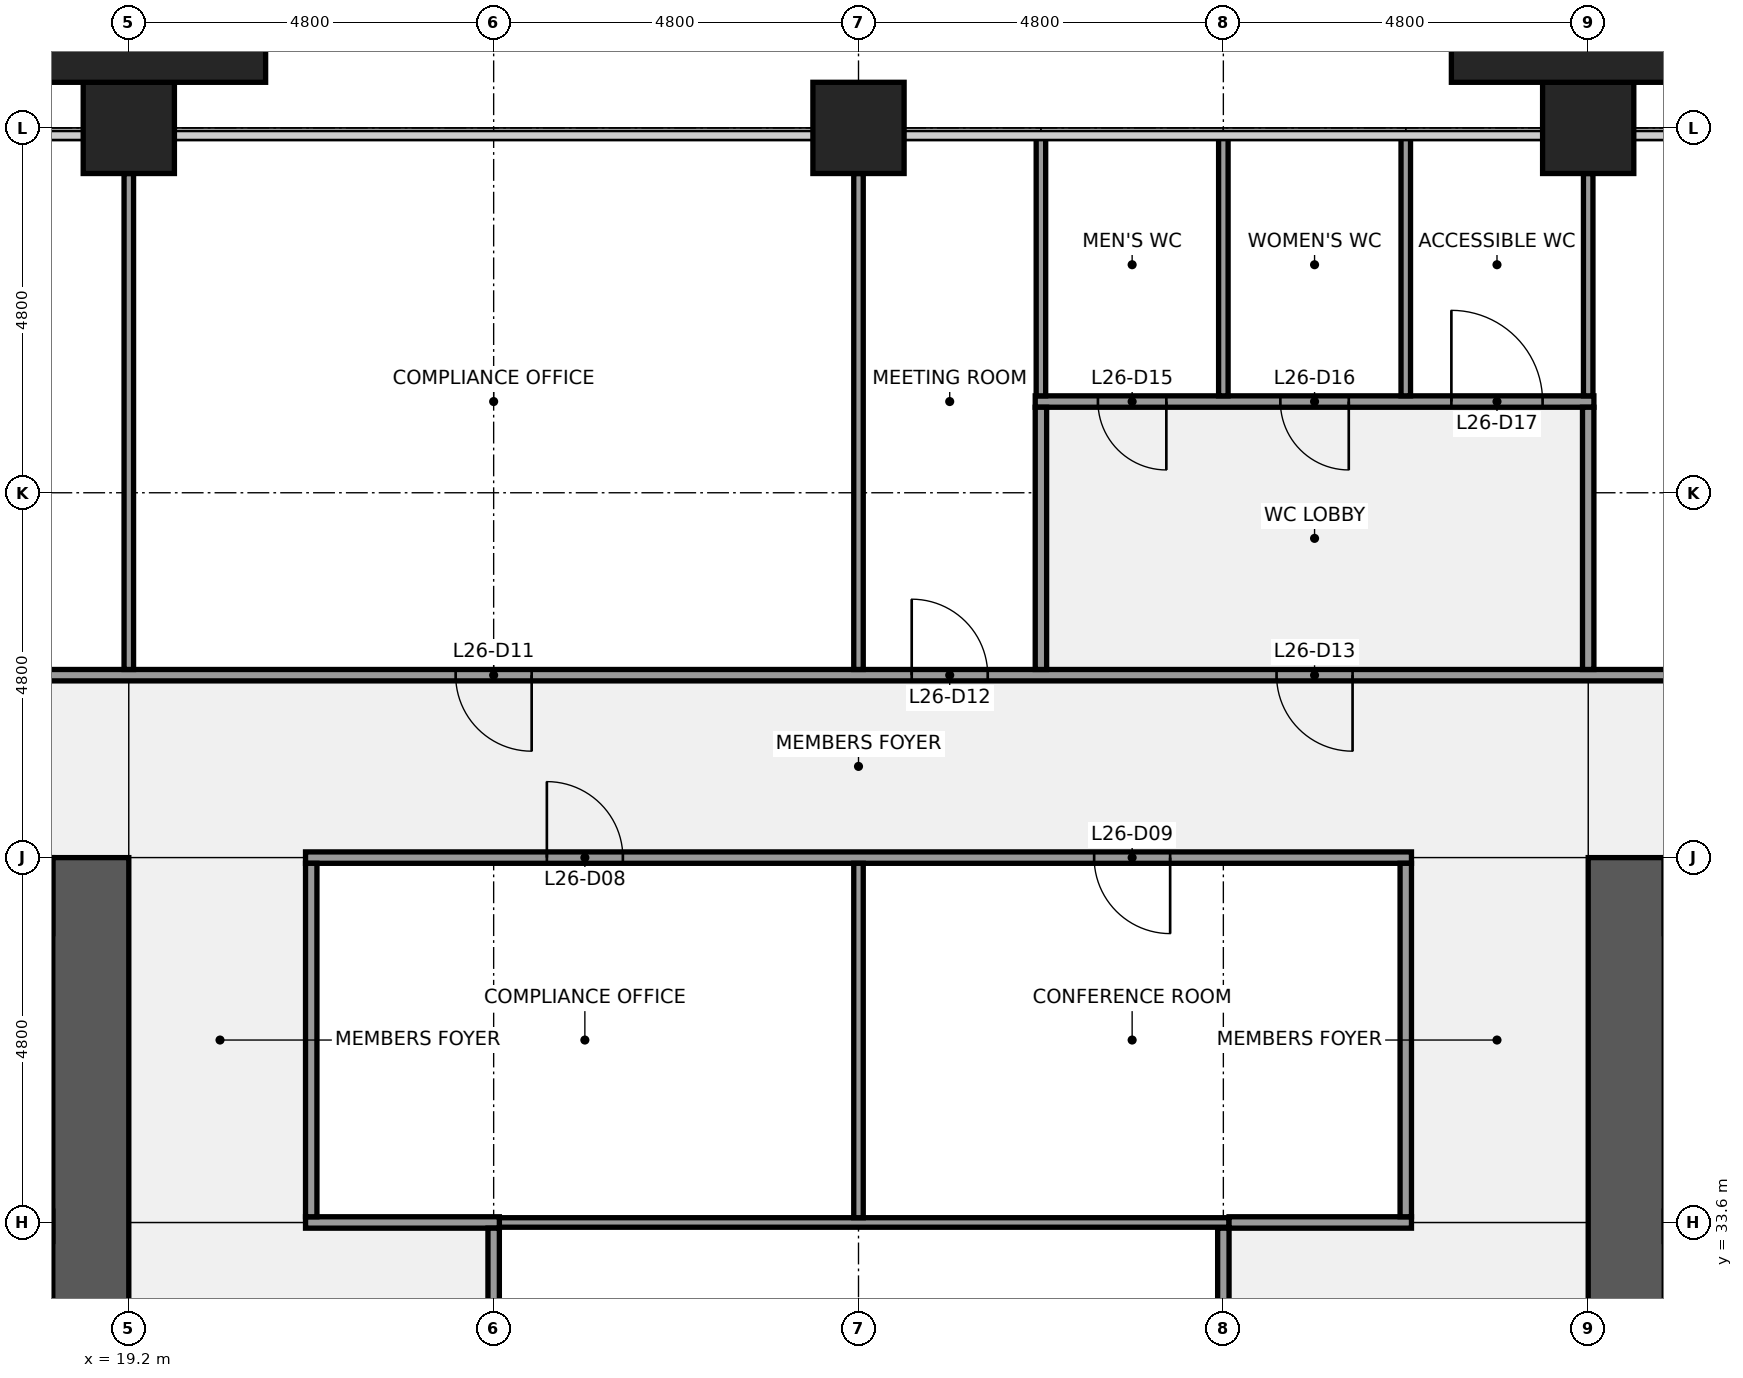
"""IFC4 building model, lengths in metres.
Left out: names, types, materials, properties, quantities, classifications, styles, units other than length and angle.
Written with IfcOpenShell. Run it as: python <this file> out.ifc"""

import sys

from ifc_helpers import new_model, si_unit, direction, frame, frame_2d, origin, origin_2d, place, context, subcontext, project, spatial, rectangle, extrude, element, fill, save


model = new_model("IFC4")
c1 = context("Model", 3, precision=1e-05, world=origin(), true_north=direction((0.0, 1.0)))
c2 = subcontext(c1, "Body", "Model", "MODEL_VIEW")
j1 = project(units=[si_unit("LENGTHUNIT", "METRE"), si_unit("PLANEANGLEUNIT", "RADIAN")], contexts=[c1])
p1 = place(None, origin())
s1 = spatial("IfcSite", under=j1, at=p1, CompositionType="ELEMENT")
p2 = place(p1, origin())
s2 = spatial("IfcBuilding", under=s1, at=p2, CompositionType="ELEMENT")
p3 = place(p2, frame((0.0, 0.0, 124.1)))
s3 = spatial("IfcBuildingStorey", under=s2, at=p3, CompositionType="ELEMENT", Elevation=124.1)
for number, where, z_axis, x_axis in (
    (1, (19.2, 48.0, 0.0), (0.0, 0.0, 1.0), (1.0, 0.0, 0.0)),
    (2, (28.8, 48.0, 0.0), (0.0, 0.0, 1.0), (1.0, 0.0, 0.0)),
    (3, (38.4, 48.0, 0.0), (0.0, 0.0, 1.0), (1.0, 0.0, 0.0)),
):
    element("IfcColumn", number, at=place(p3, frame(where, z_axis=z_axis, x_axis=x_axis)), inside=s3, PredefinedType="COLUMN", context=c2, shape_type="SweptSolid", body=[
        extrude(rectangle(XDim=1.2, YDim=1.2, at=origin_2d()), origin(), (0.0, 0.0, 1.0), 4.0),
    ])
p4 = place(p3, frame((18.7, 38.4, 0.0), z_axis=(0.0, 0.0, 1.0), x_axis=(0.0, -1.0, 0.0)))
e4 = element("IfcWall", 4, at=p4, inside=s3, PredefinedType="SHEAR", context=c2, shape_type="SweptSolid", body=[
    extrude(rectangle(XDim=28.8, YDim=1.0, at=frame_2d((14.4, 0.0))), origin(), (0.0, 0.0, 1.0), 3.84),
])
p5 = place(p4, frame((18.3, 0.0, 0.0)))
e5 = element("IfcOpeningElement", 5, at=p5, cuts=e4, PredefinedType="OPENING", context=c2, shape_type="SweptSolid", body=[
    extrude(rectangle(XDim=1.8, YDim=2.1, at=frame_2d((0.9, 1.05))), frame((0.0, 0.51, 0.0), z_axis=(0.0, -1.0, 0.0), x_axis=(1.0, 0.0, 0.0)), (0.0, 0.0, 1.0), 1.02),
])
p6 = place(p4, frame((8.7, 0.0, 0.0)))
e6 = element("IfcOpeningElement", 6, at=p6, cuts=e4, PredefinedType="OPENING", context=c2, shape_type="SweptSolid", body=[
    extrude(rectangle(XDim=1.8, YDim=2.1, at=frame_2d((0.9, 1.05))), frame((0.0, 0.51, 0.0), z_axis=(0.0, -1.0, 0.0), x_axis=(1.0, 0.0, 0.0)), (0.0, 0.0, 1.0), 1.02),
])
p7 = place(p3, frame((1.0, 33.55, 0.0), z_axis=(0.0, 0.0, 1.0), x_axis=(1.0, 0.0, 0.0)))
e7 = element("IfcWall", 7, at=p7, inside=s3, PredefinedType="SHEAR", context=c2, shape_type="SweptSolid", body=[
    extrude(rectangle(XDim=17.2, YDim=0.4, at=frame_2d((8.6, 0.0))), origin(), (0.0, 0.0, 1.0), 3.84),
])
p8 = place(p3, frame((38.9, 9.6, 0.0), z_axis=(0.0, 0.0, 1.0), x_axis=(0.0, 1.0, 0.0)))
e8 = element("IfcWall", 8, at=p8, inside=s3, PredefinedType="SHEAR", context=c2, shape_type="SweptSolid", body=[
    extrude(rectangle(XDim=28.8, YDim=1.0, at=frame_2d((14.4, 0.0))), origin(), (0.0, 0.0, 1.0), 3.84),
])
p9 = place(p8, frame((8.7, 0.0, 0.0)))
e9 = element("IfcOpeningElement", 9, at=p9, cuts=e8, PredefinedType="OPENING", context=c2, shape_type="SweptSolid", body=[
    extrude(rectangle(XDim=1.8, YDim=2.1, at=frame_2d((0.9, 1.05))), frame((0.0, 0.51, 0.0), z_axis=(0.0, -1.0, 0.0), x_axis=(1.0, 0.0, 0.0)), (0.0, 0.0, 1.0), 1.02),
])
p10 = place(p8, frame((18.3, 0.0, 0.0)))
e10 = element("IfcOpeningElement", 10, at=p10, cuts=e8, PredefinedType="OPENING", context=c2, shape_type="SweptSolid", body=[
    extrude(rectangle(XDim=1.8, YDim=2.1, at=frame_2d((0.9, 1.05))), frame((0.0, 0.51, 0.0), z_axis=(0.0, -1.0, 0.0), x_axis=(1.0, 0.0, 0.0)), (0.0, 0.0, 1.0), 1.02),
])
p11 = place(p3, frame((24.075, 33.6, 0.0), z_axis=(0.0, 0.0, 1.0), x_axis=(1.0, 0.0, 0.0)))
e11 = element("IfcWall", 11, at=p11, inside=s3, PredefinedType="PARTITIONING", context=c2, shape_type="SweptSolid", body=[
    extrude(rectangle(XDim=9.6, YDim=0.125, at=frame_2d((4.8, 0.0))), origin(), (0.0, 0.0, 1.0), 2.849),
])
p12 = place(p3, frame((21.525, 33.6, 0.0), z_axis=(0.0, 0.0, 1.0), x_axis=(1.0, 0.0, 0.0)))
e12 = element("IfcWall", 12, at=p12, inside=s3, PredefinedType="PARTITIONING", context=c2, shape_type="SweptSolid", body=[
    extrude(rectangle(XDim=2.55, YDim=0.15, at=frame_2d((1.275, 0.0))), origin(), (0.0, 0.0, 1.0), 2.849),
])
p13 = place(p3, frame((33.675, 33.6, 0.0), z_axis=(0.0, 0.0, 1.0), x_axis=(1.0, 0.0, 0.0)))
e13 = element("IfcWall", 13, at=p13, inside=s3, PredefinedType="PARTITIONING", context=c2, shape_type="SweptSolid", body=[
    extrude(rectangle(XDim=2.4, YDim=0.15, at=frame_2d((1.2, 0.0))), origin(), (0.0, 0.0, 1.0), 2.849),
])
p14 = place(p3, frame((21.525, 38.4, 0.0), z_axis=(0.0, 0.0, 1.0), x_axis=(1.0, 0.0, 0.0)))
e14 = element("IfcWall", 14, at=p14, inside=s3, PredefinedType="PARTITIONING", context=c2, shape_type="SweptSolid", body=[
    extrude(rectangle(XDim=14.55, YDim=0.15, at=frame_2d((7.275, 0.0))), origin(), (0.0, 0.0, 1.0), 2.849),
])
p15 = place(p14, frame((3.175, 0.0, 0.0)))
e15 = element("IfcOpeningElement", 15, at=p15, cuts=e14, PredefinedType="OPENING", context=c2, shape_type="SweptSolid", body=[
    extrude(rectangle(XDim=1.0, YDim=2.1, at=frame_2d((0.5, 1.05))), frame((0.0, 0.085, 0.0), z_axis=(0.0, -1.0, 0.0), x_axis=(1.0, 0.0, 0.0)), (0.0, 0.0, 1.0), 0.17),
])
p16 = place(p14, frame((10.375, 0.0, 0.0)))
e16 = element("IfcOpeningElement", 16, at=p16, cuts=e14, PredefinedType="OPENING", context=c2, shape_type="SweptSolid", body=[
    extrude(rectangle(XDim=1.0, YDim=2.1, at=frame_2d((0.5, 1.05))), frame((0.0, 0.085, 0.0), z_axis=(0.0, -1.0, 0.0), x_axis=(1.0, 0.0, 0.0)), (0.0, 0.0, 1.0), 0.17),
])
p17 = place(p3, frame((14.325, 40.8, 0.0), z_axis=(0.0, 0.0, 1.0), x_axis=(1.0, 0.0, 0.0)))
e17 = element("IfcWall", 17, at=p17, inside=s3, PredefinedType="PARTITIONING", context=c2, shape_type="SweptSolid", body=[
    extrude(rectangle(XDim=28.95, YDim=0.15, at=frame_2d((14.475, 0.0))), origin(), (0.0, 0.0, 1.0), 2.849),
])
p18 = place(p17, frame((1.975, 0.0, 0.0)))
e18 = element("IfcOpeningElement", 18, at=p18, cuts=e17, PredefinedType="OPENING", context=c2, shape_type="SweptSolid", body=[
    extrude(rectangle(XDim=1.0, YDim=2.1, at=frame_2d((0.5, 1.05))), frame((0.0, 0.085, 0.0), z_axis=(0.0, -1.0, 0.0), x_axis=(1.0, 0.0, 0.0)), (0.0, 0.0, 1.0), 0.17),
])
p19 = place(p17, frame((9.175, 0.0, 0.0)))
e19 = element("IfcOpeningElement", 19, at=p19, cuts=e17, PredefinedType="OPENING", context=c2, shape_type="SweptSolid", body=[
    extrude(rectangle(XDim=1.0, YDim=2.1, at=frame_2d((0.5, 1.05))), frame((0.0, 0.085, 0.0), z_axis=(0.0, -1.0, 0.0), x_axis=(1.0, 0.0, 0.0)), (0.0, 0.0, 1.0), 0.17),
])
p20 = place(p17, frame((15.175, 0.0, 0.0)))
e20 = element("IfcOpeningElement", 20, at=p20, cuts=e17, PredefinedType="OPENING", context=c2, shape_type="SweptSolid", body=[
    extrude(rectangle(XDim=1.0, YDim=2.1, at=frame_2d((0.5, 1.05))), frame((0.0, 0.085, 0.0), z_axis=(0.0, -1.0, 0.0), x_axis=(1.0, 0.0, 0.0)), (0.0, 0.0, 1.0), 0.17),
])
p21 = place(p17, frame((19.975, 0.0, 0.0)))
e21 = element("IfcOpeningElement", 21, at=p21, cuts=e17, PredefinedType="OPENING", context=c2, shape_type="SweptSolid", body=[
    extrude(rectangle(XDim=1.0, YDim=2.1, at=frame_2d((0.5, 1.05))), frame((0.0, 0.085, 0.0), z_axis=(0.0, -1.0, 0.0), x_axis=(1.0, 0.0, 0.0)), (0.0, 0.0, 1.0), 0.17),
])
p22 = place(p17, frame((25.975, 0.0, 0.0)))
e22 = element("IfcOpeningElement", 22, at=p22, cuts=e17, PredefinedType="OPENING", context=c2, shape_type="SweptSolid", body=[
    extrude(rectangle(XDim=1.0, YDim=2.1, at=frame_2d((0.5, 1.05))), frame((0.0, 0.085, 0.0), z_axis=(0.0, -1.0, 0.0), x_axis=(1.0, 0.0, 0.0)), (0.0, 0.0, 1.0), 0.17),
])
p23 = place(p3, frame((31.125, 44.4, 0.0), z_axis=(0.0, 0.0, 1.0), x_axis=(1.0, 0.0, 0.0)))
e23 = element("IfcWall", 23, at=p23, inside=s3, PredefinedType="PARTITIONING", context=c2, shape_type="SweptSolid", body=[
    extrude(rectangle(XDim=7.35, YDim=0.15, at=frame_2d((3.675, 0.0))), origin(), (0.0, 0.0, 1.0), 2.849),
])
p24 = place(p23, frame((0.825, 0.0, 0.0)))
e24 = element("IfcOpeningElement", 24, at=p24, cuts=e23, PredefinedType="OPENING", context=c2, shape_type="SweptSolid", body=[
    extrude(rectangle(XDim=0.9, YDim=2.1, at=frame_2d((0.45, 1.05))), frame((0.0, 0.085, 0.0), z_axis=(0.0, -1.0, 0.0), x_axis=(1.0, 0.0, 0.0)), (0.0, 0.0, 1.0), 0.17),
])
p25 = place(p23, frame((3.225, 0.0, 0.0)))
e25 = element("IfcOpeningElement", 25, at=p25, cuts=e23, PredefinedType="OPENING", context=c2, shape_type="SweptSolid", body=[
    extrude(rectangle(XDim=0.9, YDim=2.1, at=frame_2d((0.45, 1.05))), frame((0.0, 0.085, 0.0), z_axis=(0.0, -1.0, 0.0), x_axis=(1.0, 0.0, 0.0)), (0.0, 0.0, 1.0), 0.17),
])
p26 = place(p23, frame((5.475, 0.0, 0.0)))
e26 = element("IfcOpeningElement", 26, at=p26, cuts=e23, PredefinedType="OPENING", context=c2, shape_type="SweptSolid", body=[
    extrude(rectangle(XDim=1.2, YDim=2.1, at=frame_2d((0.6, 1.05))), frame((0.0, 0.085, 0.0), z_axis=(0.0, -1.0, 0.0), x_axis=(1.0, 0.0, 0.0)), (0.0, 0.0, 1.0), 0.17),
])
p27 = place(p3, frame((19.2, 40.875, 0.0), z_axis=(0.0, 0.0, 1.0), x_axis=(0.0, 1.0, 0.0)))
e27 = element("IfcWall", 27, at=p27, inside=s3, PredefinedType="PARTITIONING", context=c2, shape_type="SweptSolid", body=[
    extrude(rectangle(XDim=6.525, YDim=0.125, at=frame_2d((3.262, 0.0))), origin(), (0.0, 0.0, 1.0), 2.849),
])
p28 = place(p3, frame((21.6, 33.675, 0.0), z_axis=(0.0, 0.0, 1.0), x_axis=(0.0, 1.0, 0.0)))
e28 = element("IfcWall", 28, at=p28, inside=s3, PredefinedType="PARTITIONING", context=c2, shape_type="SweptSolid", body=[
    extrude(rectangle(XDim=4.65, YDim=0.15, at=frame_2d((2.325, 0.0))), origin(), (0.0, 0.0, 1.0), 2.849),
])
p29 = place(p3, frame((24.0, 26.475, 0.0), z_axis=(0.0, 0.0, 1.0), x_axis=(0.0, 1.0, 0.0)))
e29 = element("IfcWall", 29, at=p29, inside=s3, PredefinedType="PARTITIONING", context=c2, shape_type="SweptSolid", body=[
    extrude(rectangle(XDim=7.05, YDim=0.15, at=frame_2d((3.525, 0.0))), origin(), (0.0, 0.0, 1.0), 2.849),
])
p30 = place(p3, frame((28.8, 33.663, 0.0), z_axis=(0.0, 0.0, 1.0), x_axis=(0.0, 1.0, 0.0)))
e30 = element("IfcWall", 30, at=p30, inside=s3, PredefinedType="PARTITIONING", context=c2, shape_type="SweptSolid", body=[
    extrude(rectangle(XDim=4.662, YDim=0.125, at=frame_2d((2.331, 0.0))), origin(), (0.0, 0.0, 1.0), 2.849),
])
p31 = place(p3, frame((28.8, 40.875, 0.0), z_axis=(0.0, 0.0, 1.0), x_axis=(0.0, 1.0, 0.0)))
e31 = element("IfcWall", 31, at=p31, inside=s3, PredefinedType="PARTITIONING", context=c2, shape_type="SweptSolid", body=[
    extrude(rectangle(XDim=6.525, YDim=0.125, at=frame_2d((3.262, 0.0))), origin(), (0.0, 0.0, 1.0), 2.849),
])
p32 = place(p3, frame((31.2, 44.475, 0.0), z_axis=(0.0, 0.0, 1.0), x_axis=(0.0, 1.0, 0.0)))
e32 = element("IfcWall", 32, at=p32, inside=s3, PredefinedType="PARTITIONING", context=c2, shape_type="SweptSolid", body=[
    extrude(rectangle(XDim=3.425, YDim=0.125, at=frame_2d((1.712, 0.0))), origin(), (0.0, 0.0, 1.0), 2.849),
])
p33 = place(p3, frame((31.2, 40.875, 0.0), z_axis=(0.0, 0.0, 1.0), x_axis=(0.0, 1.0, 0.0)))
e33 = element("IfcWall", 33, at=p33, inside=s3, PredefinedType="PARTITIONING", context=c2, shape_type="SweptSolid", body=[
    extrude(rectangle(XDim=3.45, YDim=0.15, at=frame_2d((1.725, 0.0))), origin(), (0.0, 0.0, 1.0), 2.849),
])
p34 = place(p3, frame((33.6, 44.475, 0.0), z_axis=(0.0, 0.0, 1.0), x_axis=(0.0, 1.0, 0.0)))
e34 = element("IfcWall", 34, at=p34, inside=s3, PredefinedType="PARTITIONING", context=c2, shape_type="SweptSolid", body=[
    extrude(rectangle(XDim=3.425, YDim=0.125, at=frame_2d((1.712, 0.0))), origin(), (0.0, 0.0, 1.0), 2.849),
])
p35 = place(p3, frame((33.6, 26.475, 0.0), z_axis=(0.0, 0.0, 1.0), x_axis=(0.0, 1.0, 0.0)))
e35 = element("IfcWall", 35, at=p35, inside=s3, PredefinedType="PARTITIONING", context=c2, shape_type="SweptSolid", body=[
    extrude(rectangle(XDim=7.05, YDim=0.15, at=frame_2d((3.525, 0.0))), origin(), (0.0, 0.0, 1.0), 2.849),
])
p36 = place(p3, frame((36.0, 44.475, 0.0), z_axis=(0.0, 0.0, 1.0), x_axis=(0.0, 1.0, 0.0)))
e36 = element("IfcWall", 36, at=p36, inside=s3, PredefinedType="PARTITIONING", context=c2, shape_type="SweptSolid", body=[
    extrude(rectangle(XDim=3.425, YDim=0.125, at=frame_2d((1.712, 0.0))), origin(), (0.0, 0.0, 1.0), 2.849),
])
p37 = place(p3, frame((36.0, 33.675, 0.0), z_axis=(0.0, 0.0, 1.0), x_axis=(0.0, 1.0, 0.0)))
e37 = element("IfcWall", 37, at=p37, inside=s3, PredefinedType="PARTITIONING", context=c2, shape_type="SweptSolid", body=[
    extrude(rectangle(XDim=4.65, YDim=0.15, at=frame_2d((2.325, 0.0))), origin(), (0.0, 0.0, 1.0), 2.849),
])
p38 = place(p3, frame((38.4, 44.475, 0.0), z_axis=(0.0, 0.0, 1.0), x_axis=(0.0, 1.0, 0.0)))
e38 = element("IfcWall", 38, at=p38, inside=s3, PredefinedType="PARTITIONING", context=c2, shape_type="SweptSolid", body=[
    extrude(rectangle(XDim=2.925, YDim=0.125, at=frame_2d((1.462, 0.0))), origin(), (0.0, 0.0, 1.0), 2.849),
])
p39 = place(p3, frame((38.4, 40.875, 0.0), z_axis=(0.0, 0.0, 1.0), x_axis=(0.0, 1.0, 0.0)))
e39 = element("IfcWall", 39, at=p39, inside=s3, PredefinedType="PARTITIONING", context=c2, shape_type="SweptSolid", body=[
    extrude(rectangle(XDim=3.45, YDim=0.15, at=frame_2d((1.725, 0.0))), origin(), (0.0, 0.0, 1.0), 2.849),
])
for number, where, z_axis, x_axis in (
    (40, (19.2, 49.05, 0.0), (0.0, 0.0, 1.0), (1.0, 0.0, 0.0)),
    (41, (38.4, 49.05, 0.0), (0.0, 0.0, 1.0), (1.0, 0.0, 0.0)),
):
    element("IfcColumn", number, at=place(p3, frame(where, z_axis=z_axis, x_axis=x_axis)), inside=s3, PredefinedType="PILASTER", context=c2, shape_type="SweptSolid", body=[
        extrude(rectangle(XDim=3.6, YDim=0.9, at=origin_2d()), origin(), (0.0, 0.0, 1.0), 4.0),
    ])
p40 = place(p15, origin())
e42 = element("IfcDoor", 42, at=p40, inside=s3, OperationType="SINGLE_SWING_LEFT", PredefinedType="DOOR", context=c2, shape_type="SweptSolid", body=[
    extrude(rectangle(XDim=1.0, YDim=2.1, at=frame_2d((0.5, 1.05))), frame((0.0, 0.025, 0.0), z_axis=(0.0, -1.0, 0.0), x_axis=(1.0, 0.0, 0.0)), (0.0, 0.0, 1.0), 0.05),
])
fill(e15, e42)
p41 = place(p16, origin())
e43 = element("IfcDoor", 43, at=p41, inside=s3, OperationType="SINGLE_SWING_RIGHT", PredefinedType="DOOR", context=c2, shape_type="SweptSolid", body=[
    extrude(rectangle(XDim=1.0, YDim=2.1, at=frame_2d((0.5, 1.05))), frame((0.0, 0.025, 0.0), z_axis=(0.0, -1.0, 0.0), x_axis=(1.0, 0.0, 0.0)), (0.0, 0.0, 1.0), 0.05),
])
fill(e16, e43)
p42 = place(p19, origin())
e44 = element("IfcDoor", 44, at=p42, inside=s3, OperationType="SINGLE_SWING_RIGHT", PredefinedType="DOOR", context=c2, shape_type="SweptSolid", body=[
    extrude(rectangle(XDim=1.0, YDim=2.1, at=frame_2d((0.5, 1.05))), frame((0.0, 0.025, 0.0), z_axis=(0.0, -1.0, 0.0), x_axis=(1.0, 0.0, 0.0)), (0.0, 0.0, 1.0), 0.05),
])
fill(e19, e44)
p43 = place(p20, origin())
e45 = element("IfcDoor", 45, at=p43, inside=s3, OperationType="SINGLE_SWING_LEFT", PredefinedType="DOOR", context=c2, shape_type="SweptSolid", body=[
    extrude(rectangle(XDim=1.0, YDim=2.1, at=frame_2d((0.5, 1.05))), frame((0.0, 0.025, 0.0), z_axis=(0.0, -1.0, 0.0), x_axis=(1.0, 0.0, 0.0)), (0.0, 0.0, 1.0), 0.05),
])
fill(e20, e45)
p44 = place(p21, origin())
e46 = element("IfcDoor", 46, at=p44, inside=s3, OperationType="SINGLE_SWING_RIGHT", PredefinedType="DOOR", context=c2, shape_type="SweptSolid", body=[
    extrude(rectangle(XDim=1.0, YDim=2.1, at=frame_2d((0.5, 1.05))), frame((0.0, 0.025, 0.0), z_axis=(0.0, -1.0, 0.0), x_axis=(1.0, 0.0, 0.0)), (0.0, 0.0, 1.0), 0.05),
])
fill(e21, e46)
p45 = place(p24, origin())
e47 = element("IfcDoor", 47, at=p45, inside=s3, OperationType="SINGLE_SWING_RIGHT", PredefinedType="DOOR", context=c2, shape_type="SweptSolid", body=[
    extrude(rectangle(XDim=0.9, YDim=2.1, at=frame_2d((0.45, 1.05))), frame((0.0, 0.025, 0.0), z_axis=(0.0, -1.0, 0.0), x_axis=(1.0, 0.0, 0.0)), (0.0, 0.0, 1.0), 0.05),
])
fill(e24, e47)
p46 = place(p25, origin())
e48 = element("IfcDoor", 48, at=p46, inside=s3, OperationType="SINGLE_SWING_RIGHT", PredefinedType="DOOR", context=c2, shape_type="SweptSolid", body=[
    extrude(rectangle(XDim=0.9, YDim=2.1, at=frame_2d((0.45, 1.05))), frame((0.0, 0.025, 0.0), z_axis=(0.0, -1.0, 0.0), x_axis=(1.0, 0.0, 0.0)), (0.0, 0.0, 1.0), 0.05),
])
fill(e25, e48)
p47 = place(p26, origin())
e49 = element("IfcDoor", 49, at=p47, inside=s3, OperationType="SINGLE_SWING_LEFT", PredefinedType="DOOR", context=c2, shape_type="SweptSolid", body=[
    extrude(rectangle(XDim=1.2, YDim=2.1, at=frame_2d((0.6, 1.05))), frame((0.0, 0.025, 0.0), z_axis=(0.0, -1.0, 0.0), x_axis=(1.0, 0.0, 0.0)), (0.0, 0.0, 1.0), 0.05),
])
fill(e26, e49)
save(model, sys.argv[1])
